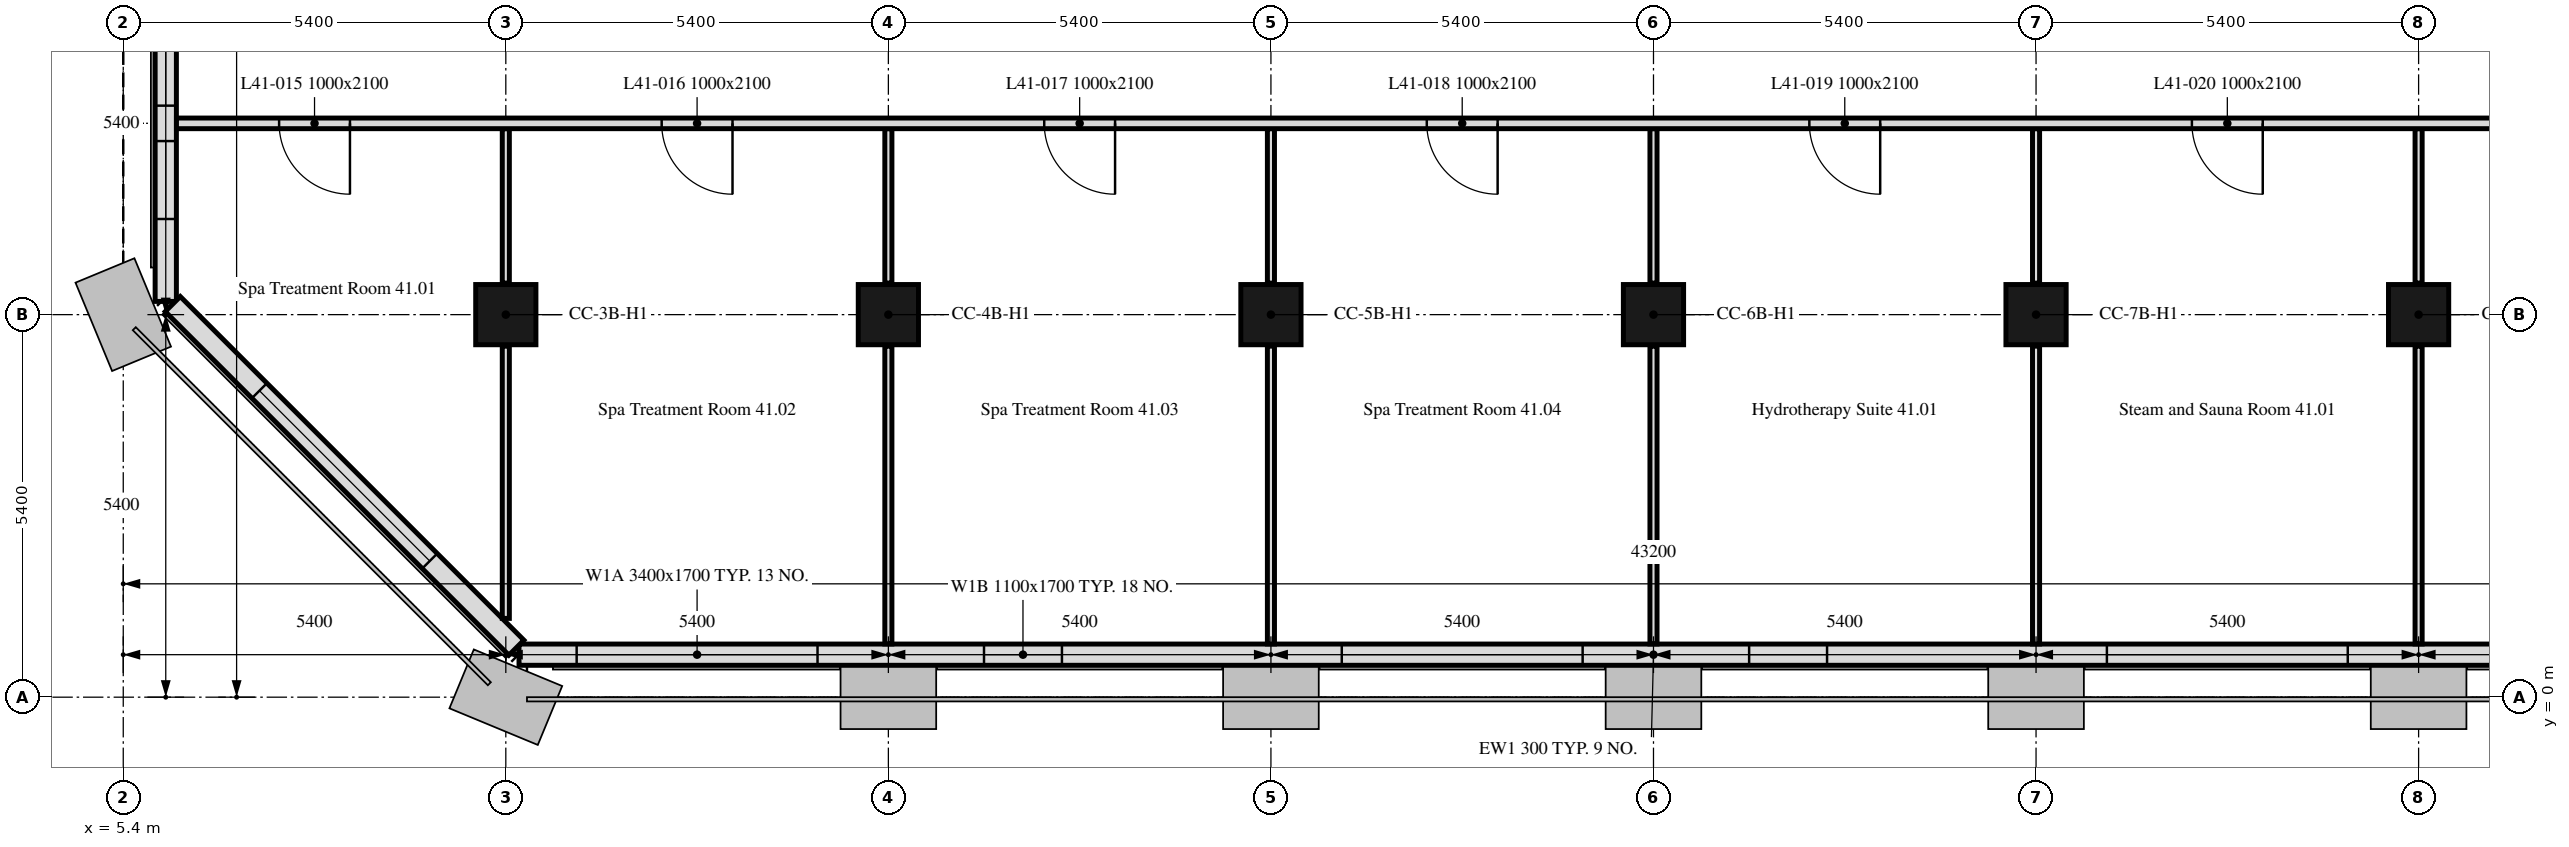
"""IFC4 building model, lengths in metres.
Left out: names, types, materials, properties, quantities, classifications, styles, units other than length and angle.
Written with IfcOpenShell. Run it as: python <this file> out.ifc"""

import sys

from ifc_helpers import new_model, si_unit, direction, frame, frame_2d, origin, origin_2d, place, context, subcontext, project, spatial, rectangle, extrude, element, fill, save


model = new_model("IFC4")
c1 = context("Model", 3, precision=1e-05, world=origin(), true_north=direction((0.0, 1.0)))
c2 = subcontext(c1, "Body", "Model", "MODEL_VIEW")
j1 = project(units=[si_unit("LENGTHUNIT", "METRE"), si_unit("PLANEANGLEUNIT", "RADIAN")], contexts=[c1])
p1 = place(None, origin())
s1 = spatial("IfcSite", under=j1, at=p1, CompositionType="ELEMENT")
p2 = place(p1, origin())
s2 = spatial("IfcBuilding", under=s1, at=p2, CompositionType="ELEMENT")
p3 = place(p2, frame((0.0, 0.0, 172.6)))
s3 = spatial("IfcBuildingStorey", under=s2, at=p3, CompositionType="ELEMENT", Elevation=172.6)
for number, where, z_axis, x_axis in (
    (1, (10.8, 5.4, 0.0), (0.0, 0.0, 1.0), (1.0, 0.0, 0.0)),
    (2, (16.2, 5.4, 0.0), (0.0, 0.0, 1.0), (1.0, 0.0, 0.0)),
    (3, (21.6, 5.4, 0.0), (0.0, 0.0, 1.0), (1.0, 0.0, 0.0)),
    (4, (27.0, 5.4, 0.0), (0.0, 0.0, 1.0), (1.0, 0.0, 0.0)),
    (5, (32.4, 5.4, 0.0), (0.0, 0.0, 1.0), (1.0, 0.0, 0.0)),
    (6, (37.8, 5.4, 0.0), (0.0, 0.0, 1.0), (1.0, 0.0, 0.0)),
):
    element("IfcColumn", number, at=place(p3, frame(where, z_axis=z_axis, x_axis=x_axis)), inside=s3, PredefinedType="COLUMN", context=c2, shape_type="SweptSolid", body=[
        extrude(rectangle(XDim=0.85, YDim=0.85, at=origin_2d()), origin(), (0.0, 0.0, 1.0), 2.8),
    ])
p4 = place(p3, frame((10.986, 0.6, 0.0), z_axis=(0.0, 0.0, 1.0), x_axis=(1.0, 0.0, 0.0)))
e7 = element("IfcWall", 7, at=p4, inside=s3, PredefinedType="SOLIDWALL", context=c2, shape_type="SweptSolid", body=[
    extrude(rectangle(XDim=32.027, YDim=0.3, at=frame_2d((16.014, 0.0))), origin(), (0.0, 0.0, 1.0), 2.8),
])
p5 = place(p4, frame((0.814, 0.0, 0.9)))
e8 = element("IfcOpeningElement", 8, at=p5, cuts=e7, PredefinedType="OPENING", context=c2, shape_type="SweptSolid", body=[
    extrude(rectangle(XDim=3.4, YDim=1.7, at=frame_2d((1.7, 0.85))), frame((0.0, 0.16, 0.0), z_axis=(0.0, -1.0, 0.0), x_axis=(1.0, 0.0, 0.0)), (0.0, 0.0, 1.0), 0.32),
])
p6 = place(p4, frame((6.564, 0.0, 0.9)))
e9 = element("IfcOpeningElement", 9, at=p6, cuts=e7, PredefinedType="OPENING", context=c2, shape_type="SweptSolid", body=[
    extrude(rectangle(XDim=1.1, YDim=1.7, at=frame_2d((0.55, 0.85))), frame((0.0, 0.16, 0.0), z_axis=(0.0, -1.0, 0.0), x_axis=(1.0, 0.0, 0.0)), (0.0, 0.0, 1.0), 0.32),
])
p7 = place(p4, frame((11.614, 0.0, 0.9)))
e10 = element("IfcOpeningElement", 10, at=p7, cuts=e7, PredefinedType="OPENING", context=c2, shape_type="SweptSolid", body=[
    extrude(rectangle(XDim=3.4, YDim=1.7, at=frame_2d((1.7, 0.85))), frame((0.0, 0.16, 0.0), z_axis=(0.0, -1.0, 0.0), x_axis=(1.0, 0.0, 0.0)), (0.0, 0.0, 1.0), 0.32),
])
p8 = place(p4, frame((17.364, 0.0, 0.9)))
e11 = element("IfcOpeningElement", 11, at=p8, cuts=e7, PredefinedType="OPENING", context=c2, shape_type="SweptSolid", body=[
    extrude(rectangle(XDim=1.1, YDim=1.7, at=frame_2d((0.55, 0.85))), frame((0.0, 0.16, 0.0), z_axis=(0.0, -1.0, 0.0), x_axis=(1.0, 0.0, 0.0)), (0.0, 0.0, 1.0), 0.32),
])
p9 = place(p4, frame((22.414, 0.0, 0.9)))
e12 = element("IfcOpeningElement", 12, at=p9, cuts=e7, PredefinedType="OPENING", context=c2, shape_type="SweptSolid", body=[
    extrude(rectangle(XDim=3.4, YDim=1.7, at=frame_2d((1.7, 0.85))), frame((0.0, 0.16, 0.0), z_axis=(0.0, -1.0, 0.0), x_axis=(1.0, 0.0, 0.0)), (0.0, 0.0, 1.0), 0.32),
])
p10 = place(p4, frame((28.164, 0.0, 0.9)))
e13 = element("IfcOpeningElement", 13, at=p10, cuts=e7, PredefinedType="OPENING", context=c2, shape_type="SweptSolid", body=[
    extrude(rectangle(XDim=1.1, YDim=1.7, at=frame_2d((0.55, 0.85))), frame((0.0, 0.16, 0.0), z_axis=(0.0, -1.0, 0.0), x_axis=(1.0, 0.0, 0.0)), (0.0, 0.0, 1.0), 0.32),
])
p11 = place(p3, frame((6.0, 16.2, 0.0), z_axis=(0.0, 0.0, 1.0), x_axis=(0.0, -1.0, 0.0)))
e14 = element("IfcWall", 14, at=p11, inside=s3, PredefinedType="SOLIDWALL", context=c2, shape_type="SweptSolid", body=[
    extrude(rectangle(XDim=10.614, YDim=0.3, at=frame_2d((5.307, 0.0))), origin(), (0.0, 0.0, 1.0), 2.8),
])
p12 = place(p11, frame((1.0, 0.0, 0.9)))
e15 = element("IfcOpeningElement", 15, at=p12, cuts=e14, PredefinedType="OPENING", context=c2, shape_type="SweptSolid", body=[
    extrude(rectangle(XDim=3.4, YDim=1.7, at=frame_2d((1.7, 0.85))), frame((0.0, 0.16, 0.0), z_axis=(0.0, -1.0, 0.0), x_axis=(1.0, 0.0, 0.0)), (0.0, 0.0, 1.0), 0.32),
])
p13 = place(p11, frame((6.75, 0.0, 0.9)))
e16 = element("IfcOpeningElement", 16, at=p13, cuts=e14, PredefinedType="OPENING", context=c2, shape_type="SweptSolid", body=[
    extrude(rectangle(XDim=1.1, YDim=1.7, at=frame_2d((0.55, 0.85))), frame((0.0, 0.16, 0.0), z_axis=(0.0, -1.0, 0.0), x_axis=(1.0, 0.0, 0.0)), (0.0, 0.0, 1.0), 0.32),
])
p14 = place(p11, frame((8.35, 0.0, 0.9)))
e17 = element("IfcOpeningElement", 17, at=p14, cuts=e14, PredefinedType="OPENING", context=c2, shape_type="SweptSolid", body=[
    extrude(rectangle(XDim=1.1, YDim=1.7, at=frame_2d((0.55, 0.85))), frame((0.0, 0.16, 0.0), z_axis=(0.0, -1.0, 0.0), x_axis=(1.0, 0.0, 0.0)), (0.0, 0.0, 1.0), 0.32),
])
p15 = place(p3, frame((6.099, 5.55, 0.0), z_axis=(0.0, 0.0, 1.0), x_axis=(0.707106781187, -0.707106781187, 0.0)))
e18 = element("IfcWall", 18, at=p15, inside=s3, PredefinedType="SOLIDWALL", context=c2, shape_type="SweptSolid", body=[
    extrude(rectangle(XDim=6.86, YDim=0.3, at=frame_2d((3.43, 0.0))), origin(), (0.0, 0.0, 1.0), 2.8),
])
p16 = place(p15, frame((1.73, 0.0, 0.9)))
e19 = element("IfcOpeningElement", 19, at=p16, cuts=e18, PredefinedType="OPENING", context=c2, shape_type="SweptSolid", body=[
    extrude(rectangle(XDim=3.4, YDim=1.7, at=frame_2d((1.7, 0.85))), frame((0.0, 0.16, 0.0), z_axis=(0.0, -1.0, 0.0), x_axis=(1.0, 0.0, 0.0)), (0.0, 0.0, 1.0), 0.32),
])
p17 = place(p3, frame((10.8, 1.112, 0.0), z_axis=(0.0, 0.0, 1.0), x_axis=(0.0, 1.0, 0.0)))
e20 = element("IfcWall", 20, at=p17, inside=s3, PredefinedType="PARTITIONING", context=c2, shape_type="SweptSolid", body=[
    extrude(rectangle(XDim=3.843, YDim=0.1, at=frame_2d((1.921, 0.0))), origin(), (0.0, 0.0, 1.0), 2.8),
])
p18 = place(p3, frame((10.8, 5.845, 0.0), z_axis=(0.0, 0.0, 1.0), x_axis=(0.0, 1.0, 0.0)))
e21 = element("IfcWall", 21, at=p18, inside=s3, PredefinedType="PARTITIONING", context=c2, shape_type="SweptSolid", body=[
    extrude(rectangle(XDim=2.18, YDim=0.1, at=frame_2d((1.09, 0.0))), origin(), (0.0, 0.0, 1.0), 2.8),
])
p19 = place(p3, frame((16.2, 0.751, 0.0), z_axis=(0.0, 0.0, 1.0), x_axis=(0.0, 1.0, 0.0)))
e22 = element("IfcWall", 22, at=p19, inside=s3, PredefinedType="PARTITIONING", context=c2, shape_type="SweptSolid", body=[
    extrude(rectangle(XDim=4.204, YDim=0.1, at=frame_2d((2.102, 0.0))), origin(), (0.0, 0.0, 1.0), 2.2),
])
p20 = place(p3, frame((16.2, 5.845, 0.0), z_axis=(0.0, 0.0, 1.0), x_axis=(0.0, 1.0, 0.0)))
e23 = element("IfcWall", 23, at=p20, inside=s3, PredefinedType="PARTITIONING", context=c2, shape_type="SweptSolid", body=[
    extrude(rectangle(XDim=2.18, YDim=0.1, at=frame_2d((1.09, 0.0))), origin(), (0.0, 0.0, 1.0), 2.2),
])
p21 = place(p3, frame((21.6, 0.751, 0.0), z_axis=(0.0, 0.0, 1.0), x_axis=(0.0, 1.0, 0.0)))
e24 = element("IfcWall", 24, at=p21, inside=s3, PredefinedType="PARTITIONING", context=c2, shape_type="SweptSolid", body=[
    extrude(rectangle(XDim=4.204, YDim=0.1, at=frame_2d((2.102, 0.0))), origin(), (0.0, 0.0, 1.0), 2.2),
])
p22 = place(p3, frame((21.6, 5.845, 0.0), z_axis=(0.0, 0.0, 1.0), x_axis=(0.0, 1.0, 0.0)))
e25 = element("IfcWall", 25, at=p22, inside=s3, PredefinedType="PARTITIONING", context=c2, shape_type="SweptSolid", body=[
    extrude(rectangle(XDim=2.18, YDim=0.1, at=frame_2d((1.09, 0.0))), origin(), (0.0, 0.0, 1.0), 2.2),
])
p23 = place(p3, frame((27.0, 0.751, 0.0), z_axis=(0.0, 0.0, 1.0), x_axis=(0.0, 1.0, 0.0)))
e26 = element("IfcWall", 26, at=p23, inside=s3, PredefinedType="PARTITIONING", context=c2, shape_type="SweptSolid", body=[
    extrude(rectangle(XDim=4.204, YDim=0.1, at=frame_2d((2.102, 0.0))), origin(), (0.0, 0.0, 1.0), 2.2),
])
p24 = place(p3, frame((27.0, 5.845, 0.0), z_axis=(0.0, 0.0, 1.0), x_axis=(0.0, 1.0, 0.0)))
e27 = element("IfcWall", 27, at=p24, inside=s3, PredefinedType="PARTITIONING", context=c2, shape_type="SweptSolid", body=[
    extrude(rectangle(XDim=2.18, YDim=0.1, at=frame_2d((1.09, 0.0))), origin(), (0.0, 0.0, 1.0), 2.2),
])
p25 = place(p3, frame((32.4, 0.751, 0.0), z_axis=(0.0, 0.0, 1.0), x_axis=(0.0, 1.0, 0.0)))
e28 = element("IfcWall", 28, at=p25, inside=s3, PredefinedType="PARTITIONING", context=c2, shape_type="SweptSolid", body=[
    extrude(rectangle(XDim=4.204, YDim=0.1, at=frame_2d((2.102, 0.0))), origin(), (0.0, 0.0, 1.0), 2.2),
])
p26 = place(p3, frame((32.4, 5.845, 0.0), z_axis=(0.0, 0.0, 1.0), x_axis=(0.0, 1.0, 0.0)))
e29 = element("IfcWall", 29, at=p26, inside=s3, PredefinedType="PARTITIONING", context=c2, shape_type="SweptSolid", body=[
    extrude(rectangle(XDim=2.18, YDim=0.1, at=frame_2d((1.09, 0.0))), origin(), (0.0, 0.0, 1.0), 2.2),
])
p27 = place(p3, frame((37.8, 0.751, 0.0), z_axis=(0.0, 0.0, 1.0), x_axis=(0.0, 1.0, 0.0)))
e30 = element("IfcWall", 30, at=p27, inside=s3, PredefinedType="PARTITIONING", context=c2, shape_type="SweptSolid", body=[
    extrude(rectangle(XDim=4.204, YDim=0.1, at=frame_2d((2.102, 0.0))), origin(), (0.0, 0.0, 1.0), 2.2),
])
p28 = place(p3, frame((37.8, 5.845, 0.0), z_axis=(0.0, 0.0, 1.0), x_axis=(0.0, 1.0, 0.0)))
e31 = element("IfcWall", 31, at=p28, inside=s3, PredefinedType="PARTITIONING", context=c2, shape_type="SweptSolid", body=[
    extrude(rectangle(XDim=2.18, YDim=0.1, at=frame_2d((1.09, 0.0))), origin(), (0.0, 0.0, 1.0), 2.2),
])
p29 = place(p3, frame((45.375, 8.1, 0.0), z_axis=(0.0, 0.0, 1.0), x_axis=(-1.0, 0.0, 0.0)))
e32 = element("IfcWall", 32, at=p29, inside=s3, PredefinedType="PARTITIONING", context=c2, shape_type="SweptSolid", body=[
    extrude(rectangle(XDim=39.224, YDim=0.15, at=frame_2d((19.612, 0.0))), origin(), (0.0, 0.0, 1.0), 2.2),
])
p30 = place(p29, frame((36.775, 0.0, 0.0)))
e33 = element("IfcOpeningElement", 33, at=p30, cuts=e32, PredefinedType="OPENING", context=c2, shape_type="SweptSolid", body=[
    extrude(rectangle(XDim=1.0, YDim=2.1, at=frame_2d((0.5, 1.05))), frame((0.0, 0.075, 0.0), z_axis=(0.0, -1.0, 0.0), x_axis=(1.0, 0.0, 0.0)), (0.0, 0.0, 1.0), 0.15),
])
p31 = place(p29, frame((31.375, 0.0, 0.0)))
e34 = element("IfcOpeningElement", 34, at=p31, cuts=e32, PredefinedType="OPENING", context=c2, shape_type="SweptSolid", body=[
    extrude(rectangle(XDim=1.0, YDim=2.1, at=frame_2d((0.5, 1.05))), frame((0.0, 0.075, 0.0), z_axis=(0.0, -1.0, 0.0), x_axis=(1.0, 0.0, 0.0)), (0.0, 0.0, 1.0), 0.15),
])
p32 = place(p29, frame((25.975, 0.0, 0.0)))
e35 = element("IfcOpeningElement", 35, at=p32, cuts=e32, PredefinedType="OPENING", context=c2, shape_type="SweptSolid", body=[
    extrude(rectangle(XDim=1.0, YDim=2.1, at=frame_2d((0.5, 1.05))), frame((0.0, 0.075, 0.0), z_axis=(0.0, -1.0, 0.0), x_axis=(1.0, 0.0, 0.0)), (0.0, 0.0, 1.0), 0.15),
])
p33 = place(p29, frame((20.575, 0.0, 0.0)))
e36 = element("IfcOpeningElement", 36, at=p33, cuts=e32, PredefinedType="OPENING", context=c2, shape_type="SweptSolid", body=[
    extrude(rectangle(XDim=1.0, YDim=2.1, at=frame_2d((0.5, 1.05))), frame((0.0, 0.075, 0.0), z_axis=(0.0, -1.0, 0.0), x_axis=(1.0, 0.0, 0.0)), (0.0, 0.0, 1.0), 0.15),
])
p34 = place(p29, frame((15.175, 0.0, 0.0)))
e37 = element("IfcOpeningElement", 37, at=p34, cuts=e32, PredefinedType="OPENING", context=c2, shape_type="SweptSolid", body=[
    extrude(rectangle(XDim=1.0, YDim=2.1, at=frame_2d((0.5, 1.05))), frame((0.0, 0.075, 0.0), z_axis=(0.0, -1.0, 0.0), x_axis=(1.0, 0.0, 0.0)), (0.0, 0.0, 1.0), 0.15),
])
p35 = place(p29, frame((9.775, 0.0, 0.0)))
e38 = element("IfcOpeningElement", 38, at=p35, cuts=e32, PredefinedType="OPENING", context=c2, shape_type="SweptSolid", body=[
    extrude(rectangle(XDim=1.0, YDim=2.1, at=frame_2d((0.5, 1.05))), frame((0.0, 0.075, 0.0), z_axis=(0.0, -1.0, 0.0), x_axis=(1.0, 0.0, 0.0)), (0.0, 0.0, 1.0), 0.15),
])
p36 = place(p29, frame((3.325, 0.0, 0.0)))
e39 = element("IfcOpeningElement", 39, at=p36, cuts=e32, PredefinedType="OPENING", context=c2, shape_type="SweptSolid", body=[
    extrude(rectangle(XDim=1.0, YDim=2.1, at=frame_2d((0.5, 1.05))), frame((0.0, 0.075, 0.0), z_axis=(0.0, -1.0, 0.0), x_axis=(1.0, 0.0, 0.0)), (0.0, 0.0, 1.0), 0.15),
])
p37 = place(p5, origin())
e40 = element("IfcWindow", 40, at=p37, inside=s3, PartitioningType="SINGLE_PANEL", PredefinedType="WINDOW", context=c2, shape_type="SweptSolid", body=[
    extrude(rectangle(XDim=3.4, YDim=1.7, at=frame_2d((1.7, 0.85))), frame((0.0, 0.03, 0.0), z_axis=(0.0, -1.0, 0.0), x_axis=(1.0, 0.0, 0.0)), (0.0, 0.0, 1.0), 0.06),
])
fill(e8, e40)
p38 = place(p6, origin())
e41 = element("IfcWindow", 41, at=p38, inside=s3, PartitioningType="SINGLE_PANEL", PredefinedType="WINDOW", context=c2, shape_type="SweptSolid", body=[
    extrude(rectangle(XDim=1.1, YDim=1.7, at=frame_2d((0.55, 0.85))), frame((0.0, 0.03, 0.0), z_axis=(0.0, -1.0, 0.0), x_axis=(1.0, 0.0, 0.0)), (0.0, 0.0, 1.0), 0.06),
])
fill(e9, e41)
p39 = place(p7, origin())
e42 = element("IfcWindow", 42, at=p39, inside=s3, PartitioningType="SINGLE_PANEL", PredefinedType="WINDOW", context=c2, shape_type="SweptSolid", body=[
    extrude(rectangle(XDim=3.4, YDim=1.7, at=frame_2d((1.7, 0.85))), frame((0.0, 0.03, 0.0), z_axis=(0.0, -1.0, 0.0), x_axis=(1.0, 0.0, 0.0)), (0.0, 0.0, 1.0), 0.06),
])
fill(e10, e42)
p40 = place(p8, origin())
e43 = element("IfcWindow", 43, at=p40, inside=s3, PartitioningType="SINGLE_PANEL", PredefinedType="WINDOW", context=c2, shape_type="SweptSolid", body=[
    extrude(rectangle(XDim=1.1, YDim=1.7, at=frame_2d((0.55, 0.85))), frame((0.0, 0.03, 0.0), z_axis=(0.0, -1.0, 0.0), x_axis=(1.0, 0.0, 0.0)), (0.0, 0.0, 1.0), 0.06),
])
fill(e11, e43)
p41 = place(p9, origin())
e44 = element("IfcWindow", 44, at=p41, inside=s3, PartitioningType="SINGLE_PANEL", PredefinedType="WINDOW", context=c2, shape_type="SweptSolid", body=[
    extrude(rectangle(XDim=3.4, YDim=1.7, at=frame_2d((1.7, 0.85))), frame((0.0, 0.03, 0.0), z_axis=(0.0, -1.0, 0.0), x_axis=(1.0, 0.0, 0.0)), (0.0, 0.0, 1.0), 0.06),
])
fill(e12, e44)
p42 = place(p13, origin())
e45 = element("IfcWindow", 45, at=p42, inside=s3, PartitioningType="SINGLE_PANEL", PredefinedType="WINDOW", context=c2, shape_type="SweptSolid", body=[
    extrude(rectangle(XDim=1.1, YDim=1.7, at=frame_2d((0.55, 0.85))), frame((0.0, 0.03, 0.0), z_axis=(0.0, -1.0, 0.0), x_axis=(1.0, 0.0, 0.0)), (0.0, 0.0, 1.0), 0.06),
])
fill(e16, e45)
p43 = place(p14, origin())
e46 = element("IfcWindow", 46, at=p43, inside=s3, PartitioningType="SINGLE_PANEL", PredefinedType="WINDOW", context=c2, shape_type="SweptSolid", body=[
    extrude(rectangle(XDim=1.1, YDim=1.7, at=frame_2d((0.55, 0.85))), frame((0.0, 0.03, 0.0), z_axis=(0.0, -1.0, 0.0), x_axis=(1.0, 0.0, 0.0)), (0.0, 0.0, 1.0), 0.06),
])
fill(e17, e46)
p44 = place(p16, origin())
e47 = element("IfcWindow", 47, at=p44, inside=s3, PartitioningType="SINGLE_PANEL", PredefinedType="WINDOW", context=c2, shape_type="SweptSolid", body=[
    extrude(rectangle(XDim=3.4, YDim=1.7, at=frame_2d((1.7, 0.85))), frame((0.0, 0.03, 0.0), z_axis=(0.0, -1.0, 0.0), x_axis=(1.0, 0.0, 0.0)), (0.0, 0.0, 1.0), 0.06),
])
fill(e19, e47)
p45 = place(p30, origin())
e48 = element("IfcDoor", 48, at=p45, inside=s3, OperationType="SINGLE_SWING_RIGHT", PredefinedType="DOOR", context=c2, shape_type="SweptSolid", body=[
    extrude(rectangle(XDim=1.0, YDim=2.1, at=frame_2d((0.5, 1.05))), frame((0.0, 0.025, 0.0), z_axis=(0.0, -1.0, 0.0), x_axis=(1.0, 0.0, 0.0)), (0.0, 0.0, 1.0), 0.05),
])
fill(e33, e48)
p46 = place(p31, origin())
e49 = element("IfcDoor", 49, at=p46, inside=s3, OperationType="SINGLE_SWING_LEFT", PredefinedType="DOOR", context=c2, shape_type="SweptSolid", body=[
    extrude(rectangle(XDim=1.0, YDim=2.1, at=frame_2d((0.5, 1.05))), frame((0.0, 0.025, 0.0), z_axis=(0.0, -1.0, 0.0), x_axis=(1.0, 0.0, 0.0)), (0.0, 0.0, 1.0), 0.05),
])
fill(e34, e49)
p47 = place(p32, origin())
e50 = element("IfcDoor", 50, at=p47, inside=s3, OperationType="SINGLE_SWING_LEFT", PredefinedType="DOOR", context=c2, shape_type="SweptSolid", body=[
    extrude(rectangle(XDim=1.0, YDim=2.1, at=frame_2d((0.5, 1.05))), frame((0.0, 0.025, 0.0), z_axis=(0.0, -1.0, 0.0), x_axis=(1.0, 0.0, 0.0)), (0.0, 0.0, 1.0), 0.05),
])
fill(e35, e50)
p48 = place(p33, origin())
e51 = element("IfcDoor", 51, at=p48, inside=s3, OperationType="SINGLE_SWING_RIGHT", PredefinedType="DOOR", context=c2, shape_type="SweptSolid", body=[
    extrude(rectangle(XDim=1.0, YDim=2.1, at=frame_2d((0.5, 1.05))), frame((0.0, 0.025, 0.0), z_axis=(0.0, -1.0, 0.0), x_axis=(1.0, 0.0, 0.0)), (0.0, 0.0, 1.0), 0.05),
])
fill(e36, e51)
p49 = place(p34, origin())
e52 = element("IfcDoor", 52, at=p49, inside=s3, OperationType="SINGLE_SWING_RIGHT", PredefinedType="DOOR", context=c2, shape_type="SweptSolid", body=[
    extrude(rectangle(XDim=1.0, YDim=2.1, at=frame_2d((0.5, 1.05))), frame((0.0, 0.025, 0.0), z_axis=(0.0, -1.0, 0.0), x_axis=(1.0, 0.0, 0.0)), (0.0, 0.0, 1.0), 0.05),
])
fill(e37, e52)
p50 = place(p35, origin())
e53 = element("IfcDoor", 53, at=p50, inside=s3, OperationType="SINGLE_SWING_LEFT", PredefinedType="DOOR", context=c2, shape_type="SweptSolid", body=[
    extrude(rectangle(XDim=1.0, YDim=2.1, at=frame_2d((0.5, 1.05))), frame((0.0, 0.025, 0.0), z_axis=(0.0, -1.0, 0.0), x_axis=(1.0, 0.0, 0.0)), (0.0, 0.0, 1.0), 0.05),
])
fill(e38, e53)
save(model, sys.argv[1])
